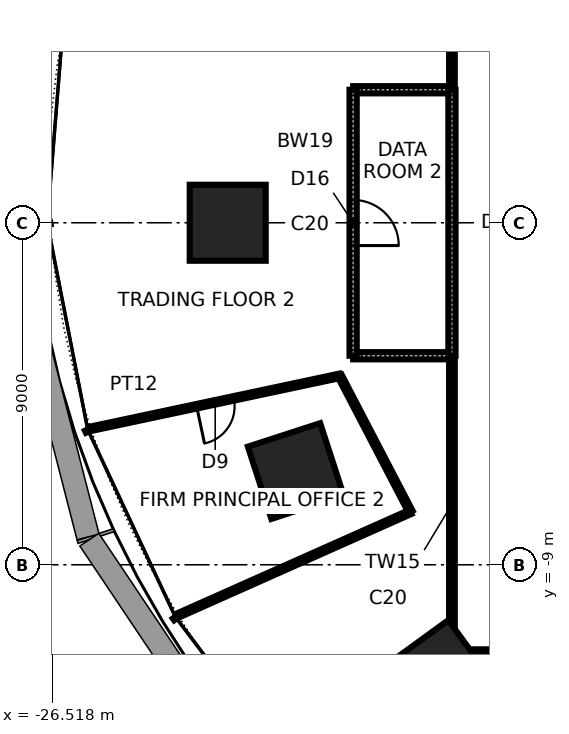
"""IFC4 building model, lengths in metres.
Left out: names, types, materials, properties, quantities, classifications, styles, units other than length and angle.
Written with IfcOpenShell. Run it as: python <this file> out.ifc"""

import sys

from ifc_helpers import new_model, si_unit, direction, frame, frame_2d, origin, origin_2d, place, context, subcontext, project, spatial, rectangle, extrude, element, fill, save


model = new_model("IFC4")
c1 = context("Model", 3, precision=1e-05, world=origin(), true_north=direction((0.0, 1.0)))
c2 = subcontext(c1, "Body", "Model", "MODEL_VIEW")
j1 = project(units=[si_unit("LENGTHUNIT", "METRE"), si_unit("PLANEANGLEUNIT", "RADIAN")], contexts=[c1])
p1 = place(None, origin())
s1 = spatial("IfcSite", under=j1, at=p1, CompositionType="ELEMENT")
p2 = place(p1, origin())
s2 = spatial("IfcBuilding", under=s1, at=p2, CompositionType="ELEMENT")
p3 = place(p2, frame((0.0, 0.0, 65.8)))
s3 = spatial("IfcBuildingStorey", under=s2, at=p3, CompositionType="ELEMENT", Elevation=65.8)
for number, where, z_axis, x_axis in (
    (1, (-21.9, 0.0, 0.0), (0.0, 0.0, 1.0), (-1.0, 0.0, 0.0)),
    (2, (-20.109, -6.534, 0.0), (0.0, 0.0, 1.0), (-0.951, -0.309, 0.0)),
    (3, (-16.315, -11.854, 0.0), (0.0, 0.0, 1.0), (-0.809, -0.588, 0.0)),
):
    element("IfcColumn", number, at=place(p3, frame(where, z_axis=z_axis, x_axis=x_axis)), inside=s3, PredefinedType="COLUMN", context=c2, shape_type="SweptSolid", body=[
        extrude(rectangle(XDim=2.0, YDim=2.0, at=origin_2d()), origin(), (0.0, 0.0, 1.0), 4.2),
    ])
p4 = place(p3, frame((-18.6, -3.5, 0.0), z_axis=(0.0, 0.0, 1.0), x_axis=(1.0, 0.0, 0.0)))
e4 = element("IfcWall", 4, at=p4, inside=s3, PredefinedType="SOLIDWALL", context=c2, shape_type="SweptSolid", body=[
    extrude(rectangle(XDim=2.6, YDim=0.19, at=frame_2d((1.3, 0.0))), origin(), (0.0, 0.0, 1.0), 4.04),
])
p5 = place(p3, frame((-18.953, -4.029, 0.0), z_axis=(0.0, 0.0, 1.0), x_axis=(-0.978145049807, -0.207923691622, 0.0)))
e5 = element("IfcWall", 5, at=p5, inside=s3, PredefinedType="PARTITIONING", context=c2, shape_type="SweptSolid", body=[
    extrude(rectangle(XDim=6.7, YDim=0.12, at=frame_2d((3.35, 0.0))), origin(), (0.0, 0.0, 1.0), 4.04),
])
p6 = place(p5, frame((2.85, 0.0, 0.0)))
e6 = element("IfcOpeningElement", 6, at=p6, cuts=e5, PredefinedType="OPENING", context=c2, shape_type="SweptSolid", body=[
    extrude(rectangle(XDim=1.0, YDim=2.4, at=frame_2d((0.5, 1.2))), frame((0.0, 0.07, 0.0), z_axis=(0.0, -1.0, 0.0), x_axis=(1.0, 0.0, 0.0)), (0.0, 0.0, 1.0), 0.14),
])
p7 = place(p3, frame((-17.087, -7.608, 0.0), z_axis=(0.0, 0.0, 1.0), x_axis=(-0.462175272874, 0.886788597775, 0.0)))
e7 = element("IfcWall", 7, at=p7, inside=s3, PredefinedType="PARTITIONING", context=c2, shape_type="SweptSolid", body=[
    extrude(rectangle(XDim=4.036, YDim=0.12, at=frame_2d((2.018, 0.0))), origin(), (0.0, 0.0, 1.0), 4.04),
])
p8 = place(p3, frame((-23.208, -10.333, 0.0), z_axis=(0.0, 0.0, 1.0), x_axis=(0.91354990356, 0.406726657235, 0.0)))
e8 = element("IfcWall", 8, at=p8, inside=s3, PredefinedType="PARTITIONING", context=c2, shape_type="SweptSolid", body=[
    extrude(rectangle(XDim=6.7, YDim=0.12, at=frame_2d((3.35, 0.0))), origin(), (0.0, 0.0, 1.0), 4.04),
])
p9 = place(p3, frame((-16.0, -3.5, 0.0), z_axis=(0.0, 0.0, 1.0), x_axis=(0.0, -1.0, 0.0)))
e9 = element("IfcWall", 9, at=p9, inside=s3, PredefinedType="PARTITIONING", context=c2, shape_type="SweptSolid", body=[
    extrude(rectangle(XDim=7.8, YDim=0.15, at=frame_2d((3.9, 0.0))), origin(), (0.0, 0.0, 1.0), 4.04),
])
p10 = place(p3, frame((-10.175, -11.3, 0.0), z_axis=(0.0, 0.0, 1.0), x_axis=(-0.669136564673, -0.743139460544, 0.0)))
e10 = element("IfcWall", 10, at=p10, inside=s3, PredefinedType="PARTITIONING", context=c2, shape_type="SweptSolid", body=[
    extrude(rectangle(XDim=9.026, YDim=0.15, at=frame_2d((4.513, 0.0))), origin(), (0.0, 0.0, 1.0), 4.04),
])
p11 = place(p3, frame((-16.0, -11.3, 0.0), z_axis=(0.0, 0.0, 1.0), x_axis=(1.0, 0.0, 0.0)))
e11 = element("IfcWall", 11, at=p11, inside=s3, PredefinedType="PARTITIONING", context=c2, shape_type="SweptSolid", body=[
    extrude(rectangle(XDim=12.0, YDim=0.15, at=frame_2d((6.0, 0.0))), origin(), (0.0, 0.0, 1.0), 4.04),
])
p12 = place(p3, frame((-16.0, 11.3, 0.0), z_axis=(0.0, 0.0, 1.0), x_axis=(0.0, -1.0, 0.0)))
e12 = element("IfcWall", 12, at=p12, inside=s3, PredefinedType="PARTITIONING", context=c2, shape_type="SweptSolid", body=[
    extrude(rectangle(XDim=7.8, YDim=0.15, at=frame_2d((3.9, 0.0))), origin(), (0.0, 0.0, 1.0), 4.04),
])
p13 = place(p12, frame((2.9, 0.0, 0.0)))
e13 = element("IfcOpeningElement", 13, at=p13, cuts=e12, PredefinedType="OPENING", context=c2, shape_type="SweptSolid", body=[
    extrude(rectangle(XDim=2.0, YDim=2.4, at=frame_2d((1.0, 1.2))), frame((0.0, 0.085, 0.0), z_axis=(0.0, -1.0, 0.0), x_axis=(1.0, 0.0, 0.0)), (0.0, 0.0, 1.0), 0.17),
])
p14 = place(p3, frame((-16.0, 3.5, 0.0), z_axis=(0.0, 0.0, 1.0), x_axis=(-1.0, 0.0, 0.0)))
e14 = element("IfcWall", 14, at=p14, inside=s3, PredefinedType="SOLIDWALL", context=c2, shape_type="SweptSolid", body=[
    extrude(rectangle(XDim=2.6, YDim=0.19, at=frame_2d((1.3, 0.0))), origin(), (0.0, 0.0, 1.0), 4.04),
])
p15 = place(p3, frame((-18.6, 3.5, 0.0), z_axis=(0.0, 0.0, 1.0), x_axis=(0.0, -1.0, 0.0)))
e15 = element("IfcWall", 15, at=p15, inside=s3, PredefinedType="SOLIDWALL", context=c2, shape_type="SweptSolid", body=[
    extrude(rectangle(XDim=7.0, YDim=0.19, at=frame_2d((3.5, 0.0))), origin(), (0.0, 0.0, 1.0), 3.586),
])
p16 = place(p15, frame((2.9, 0.0, 0.0)))
e16 = element("IfcOpeningElement", 16, at=p16, cuts=e15, PredefinedType="OPENING", context=c2, shape_type="SweptSolid", body=[
    extrude(rectangle(XDim=1.2, YDim=2.1, at=frame_2d((0.6, 1.05))), frame((0.0, 0.105, 0.0), z_axis=(0.0, -1.0, 0.0), x_axis=(1.0, 0.0, 0.0)), (0.0, 0.0, 1.0), 0.21),
])
p17 = place(p3, frame((-16.0, -3.5, 0.0), z_axis=(0.0, 0.0, 1.0), x_axis=(0.0, 1.0, 0.0)))
e17 = element("IfcWall", 17, at=p17, inside=s3, PredefinedType="SOLIDWALL", context=c2, shape_type="SweptSolid", body=[
    extrude(rectangle(XDim=7.0, YDim=0.19, at=frame_2d((3.5, 0.0))), origin(), (0.0, 0.0, 1.0), 4.04),
])
p18 = place(p6, origin())
e18 = element("IfcDoor", 18, at=p18, inside=s3, OperationType="SINGLE_SWING_RIGHT", PredefinedType="DOOR", context=c2, shape_type="SweptSolid", body=[
    extrude(rectangle(XDim=1.0, YDim=2.4, at=frame_2d((0.5, 1.2))), frame((0.0, 0.025, 0.0), z_axis=(0.0, -1.0, 0.0), x_axis=(1.0, 0.0, 0.0)), (0.0, 0.0, 1.0), 0.05),
])
fill(e6, e18)
p19 = place(p16, origin())
e19 = element("IfcDoor", 19, at=p19, inside=s3, OperationType="SINGLE_SWING_RIGHT", PredefinedType="DOOR", context=c2, shape_type="SweptSolid", body=[
    extrude(rectangle(XDim=1.2, YDim=2.1, at=frame_2d((0.6, 1.05))), frame((0.0, 0.025, 0.0), z_axis=(0.0, -1.0, 0.0), x_axis=(1.0, 0.0, 0.0)), (0.0, 0.0, 1.0), 0.05),
])
fill(e16, e19)
save(model, sys.argv[1])
